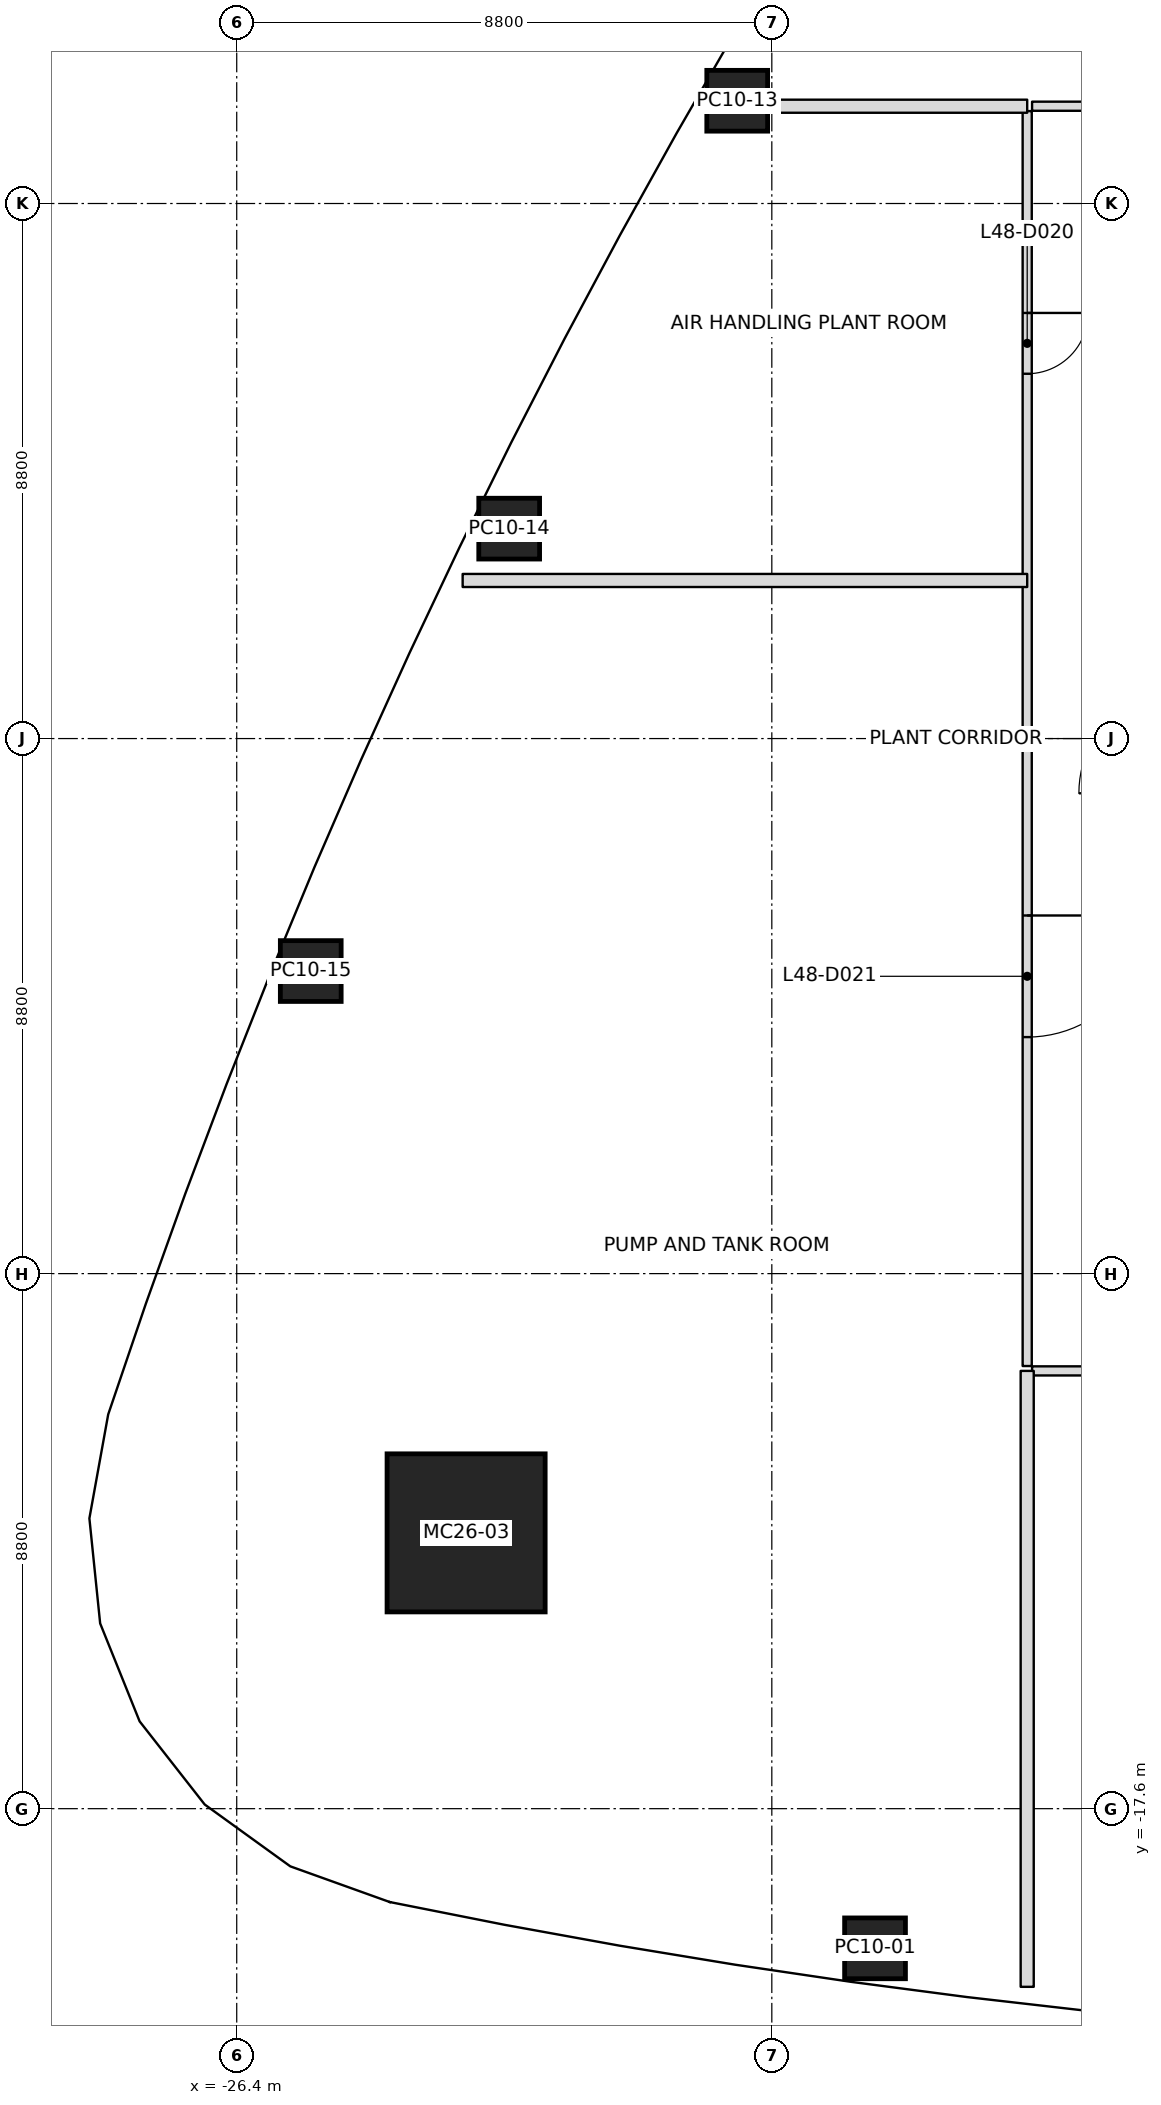
"""IFC4 building model, lengths in metres.
Left out: names, types, materials, properties, quantities, classifications, styles, units other than length and angle.
Written with IfcOpenShell. Run it as: python <this file> out.ifc"""

import sys

from ifc_helpers import new_model, si_unit, direction, frame, frame_2d, origin, origin_2d, place, context, subcontext, project, spatial, rectangle, extrude, clip, halfspace, element, fill, save


model = new_model("IFC4")
c1 = context("Model", 3, precision=1e-05, world=origin(), true_north=direction((0.0, 1.0)))
c2 = subcontext(c1, "Body", "Model", "MODEL_VIEW")
j1 = project(units=[si_unit("LENGTHUNIT", "METRE"), si_unit("PLANEANGLEUNIT", "RADIAN")], contexts=[c1])
p1 = place(None, origin())
s1 = spatial("IfcSite", under=j1, at=p1, CompositionType="ELEMENT")
p2 = place(p1, origin())
s2 = spatial("IfcBuilding", under=s1, at=p2, CompositionType="ELEMENT")
p3 = place(p2, frame((0.0, 0.0, 213.8)))
s3 = spatial("IfcBuildingStorey", under=s2, at=p3, CompositionType="ELEMENT", Elevation=213.8)
p4 = place(p3, frame((-22.628, -13.064, 0.0), z_axis=(0.018631757772, 0.01073970317, 0.999768731447), x_axis=(0.999826413735, -0.000200134289, -0.018630682863)))
e1 = element("IfcColumn", 1, at=p4, inside=s3, PredefinedType="COLUMN", context=c2, shape_type="SweptSolid", body=[
    clip(clip(extrude(rectangle(XDim=2.6, YDim=2.6, at=origin_2d()), origin(), (0.0, 0.0, 1.0), 6.001), halfspace(frame((0.0, 0.0, 0.01)), True)), halfspace(frame((0.0, 0.0, 5.998)), False)),
])
p5 = place(p3, frame((-15.903, -19.897, 0.0), z_axis=(0.011717661814, 0.006957361702, 0.999907141449), x_axis=(-0.990698760026, 0.135654731655, 0.010665864411)))
e2 = element("IfcColumn", 2, at=p5, inside=s3, PredefinedType="COLUMN", context=c2, shape_type="SweptSolid", body=[
    clip(clip(extrude(rectangle(XDim=1.0, YDim=1.0, at=origin_2d()), origin(), (0.0, 0.0, 1.0), 6.0), halfspace(frame((0.0, 0.0, 0.003)), True)), halfspace(frame((0.0, 0.0, 6.0)), False)),
])
p6 = place(p3, frame((-18.169, 10.49, 0.0), z_axis=(0.006591605453, -0.00382475872, 0.999970960558), x_axis=(0.499989137566, 0.866031674963, 1.6631558e-05)))
e3 = element("IfcColumn", 3, at=p6, inside=s3, PredefinedType="COLUMN", context=c2, shape_type="SweptSolid", body=[
    clip(clip(extrude(rectangle(XDim=1.0, YDim=1.0, at=origin_2d()), origin(), (0.0, 0.0, 1.0), 6.0), halfspace(frame((0.0, 0.0, 0.001)), True)), halfspace(frame((0.0, 0.0, 6.0)), False)),
])
p7 = place(p3, frame((-21.919, 3.452, 0.0), z_axis=(0.009358305185, 0.001383401636, 0.999955253161), x_axis=(0.439982595299, 0.897990304012, -0.005360012502)))
e4 = element("IfcColumn", 4, at=p7, inside=s3, PredefinedType="COLUMN", context=c2, shape_type="SweptSolid", body=[
    clip(clip(extrude(rectangle(XDim=1.0, YDim=1.0, at=origin_2d()), origin(), (0.0, 0.0, 1.0), 6.0), halfspace(frame((0.0, 0.0, 0.002)), True)), halfspace(frame((0.0, 0.0, 6.0)), False)),
])
p8 = place(p3, frame((-25.183, -3.823, 0.0), z_axis=(0.011880410578, 0.006631873028, 0.999907432768), x_axis=(0.377943383982, 0.925767674495, -0.010630680301)))
e5 = element("IfcColumn", 5, at=p8, inside=s3, PredefinedType="COLUMN", context=c2, shape_type="SweptSolid", body=[
    clip(clip(extrude(rectangle(XDim=1.0, YDim=1.0, at=origin_2d()), origin(), (0.0, 0.0, 1.0), 6.0), halfspace(frame((0.0, 0.0, 0.003)), True)), halfspace(frame((0.0, 0.0, 6.0)), False)),
])
p9 = place(p3, frame((-13.4, 2.6, 0.0), z_axis=(0.0, 0.0, 1.0), x_axis=(-1.0, 0.0, 0.0)))
e6 = element("IfcWall", 6, at=p9, inside=s3, PredefinedType="PARTITIONING", context=c2, shape_type="SweptSolid", body=[
    extrude(rectangle(XDim=9.284, YDim=0.215, at=frame_2d((4.642, 0.0))), origin(), (0.0, 0.0, 1.0), 5.234),
])
p10 = place(p3, frame((-13.4, 10.4, 0.0), z_axis=(0.0, 0.0, 1.0), x_axis=(-1.0, 0.0, 0.0)))
e7 = element("IfcWall", 7, at=p10, inside=s3, PredefinedType="PARTITIONING", context=c2, shape_type="SweptSolid", body=[
    extrude(rectangle(XDim=5.186, YDim=0.215, at=frame_2d((2.593, 0.0))), origin(), (0.0, 0.0, 1.0), 5.45),
])
p11 = place(p3, frame((-13.4, -10.4, 0.0), z_axis=(0.0, 0.0, 1.0), x_axis=(0.0, -1.0, 0.0)))
e8 = element("IfcWall", 8, at=p11, inside=s3, PredefinedType="PARTITIONING", context=c2, shape_type="SweptSolid", body=[
    extrude(rectangle(XDim=10.13, YDim=0.215, at=frame_2d((5.065, 0.0))), origin(), (0.0, 0.0, 1.0), 5.234),
])
p12 = place(p3, frame((-13.4, 10.32, 0.0), z_axis=(0.0, 0.0, 1.0), x_axis=(0.0, -1.0, 0.0)))
e9 = element("IfcWall", 9, at=p12, inside=s3, PredefinedType="PARTITIONING", context=c2, shape_type="SweptSolid", body=[
    extrude(rectangle(XDim=20.64, YDim=0.15, at=frame_2d((10.32, 0.0))), origin(), (0.0, 0.0, 1.0), 5.233),
])
p13 = place(p12, frame((3.32, 0.0, 0.0)))
e10 = element("IfcOpeningElement", 10, at=p13, cuts=e9, PredefinedType="OPENING", context=c2, shape_type="SweptSolid", body=[
    extrude(rectangle(XDim=1.0, YDim=2.4, at=frame_2d((0.5, 1.2))), frame((0.0, 0.075, 0.0), z_axis=(0.0, -1.0, 0.0), x_axis=(1.0, 0.0, 0.0)), (0.0, 0.0, 1.0), 0.15),
])
p14 = place(p12, frame((13.23, 0.0, 0.0)))
e11 = element("IfcOpeningElement", 11, at=p14, cuts=e9, PredefinedType="OPENING", context=c2, shape_type="SweptSolid", body=[
    extrude(rectangle(XDim=2.0, YDim=2.4, at=frame_2d((1.0, 1.2))), frame((0.0, 0.075, 0.0), z_axis=(0.0, -1.0, 0.0), x_axis=(1.0, 0.0, 0.0)), (0.0, 0.0, 1.0), 0.15),
])
p15 = place(p3, frame((-13.32, -10.4, 0.0), z_axis=(0.0, 0.0, 1.0), x_axis=(1.0, 0.0, 0.0)))
e12 = element("IfcWall", 12, at=p15, inside=s3, PredefinedType="PARTITIONING", context=c2, shape_type="SweptSolid", body=[
    extrude(rectangle(XDim=26.64, YDim=0.15, at=frame_2d((13.32, 0.0))), origin(), (0.0, 0.0, 1.0), 5.317),
])
p16 = place(p15, frame((7.32, 0.0, 0.0)))
e13 = element("IfcOpeningElement", 13, at=p16, cuts=e12, PredefinedType="OPENING", context=c2, shape_type="SweptSolid", body=[
    extrude(rectangle(XDim=2.0, YDim=2.4, at=frame_2d((1.0, 1.2))), frame((0.0, 0.075, 0.0), z_axis=(0.0, -1.0, 0.0), x_axis=(1.0, 0.0, 0.0)), (0.0, 0.0, 1.0), 0.15),
])
p17 = place(p15, frame((20.97, 0.0, 0.0)))
e14 = element("IfcOpeningElement", 14, at=p17, cuts=e12, PredefinedType="OPENING", context=c2, shape_type="SweptSolid", body=[
    extrude(rectangle(XDim=1.5, YDim=2.4, at=frame_2d((0.75, 1.2))), frame((0.0, 0.075, 0.0), z_axis=(0.0, -1.0, 0.0), x_axis=(1.0, 0.0, 0.0)), (0.0, 0.0, 1.0), 0.15),
])
p18 = place(p3, frame((13.32, 10.4, 0.0), z_axis=(0.0, 0.0, 1.0), x_axis=(-1.0, 0.0, 0.0)))
e15 = element("IfcWall", 15, at=p18, inside=s3, PredefinedType="PARTITIONING", context=c2, shape_type="SweptSolid", body=[
    extrude(rectangle(XDim=26.64, YDim=0.15, at=frame_2d((13.32, 0.0))), origin(), (0.0, 0.0, 1.0), 5.233),
])
p19 = place(p18, frame((4.81, 0.0, 0.0)))
e16 = element("IfcOpeningElement", 16, at=p19, cuts=e15, PredefinedType="OPENING", context=c2, shape_type="SweptSolid", body=[
    extrude(rectangle(XDim=2.0, YDim=2.4, at=frame_2d((1.0, 1.2))), frame((0.0, 0.075, 0.0), z_axis=(0.0, -1.0, 0.0), x_axis=(1.0, 0.0, 0.0)), (0.0, 0.0, 1.0), 0.15),
])
p20 = place(p18, frame((18.23, 0.0, 0.0)))
e17 = element("IfcOpeningElement", 17, at=p20, cuts=e15, PredefinedType="OPENING", context=c2, shape_type="SweptSolid", body=[
    extrude(rectangle(XDim=2.0, YDim=2.4, at=frame_2d((1.0, 1.2))), frame((0.0, 0.075, 0.0), z_axis=(0.0, -1.0, 0.0), x_axis=(1.0, 0.0, 0.0)), (0.0, 0.0, 1.0), 0.15),
])
p21 = place(p13, origin())
e18 = element("IfcDoor", 18, at=p21, inside=s3, OperationType="SINGLE_SWING_LEFT", PredefinedType="DOOR", context=c2, shape_type="SweptSolid", body=[
    extrude(rectangle(XDim=1.0, YDim=2.4, at=frame_2d((0.5, 1.2))), frame((0.0, 0.025, 0.0), z_axis=(0.0, -1.0, 0.0), x_axis=(1.0, 0.0, 0.0)), (0.0, 0.0, 1.0), 0.05),
])
fill(e10, e18)
p22 = place(p14, origin())
e19 = element("IfcDoor", 19, at=p22, inside=s3, OperationType="DOUBLE_DOOR_SINGLE_SWING", PredefinedType="DOOR", context=c2, shape_type="SweptSolid", body=[
    extrude(rectangle(XDim=2.0, YDim=2.4, at=frame_2d((1.0, 1.2))), frame((0.0, 0.025, 0.0), z_axis=(0.0, -1.0, 0.0), x_axis=(1.0, 0.0, 0.0)), (0.0, 0.0, 1.0), 0.05),
])
fill(e11, e19)
save(model, sys.argv[1])
